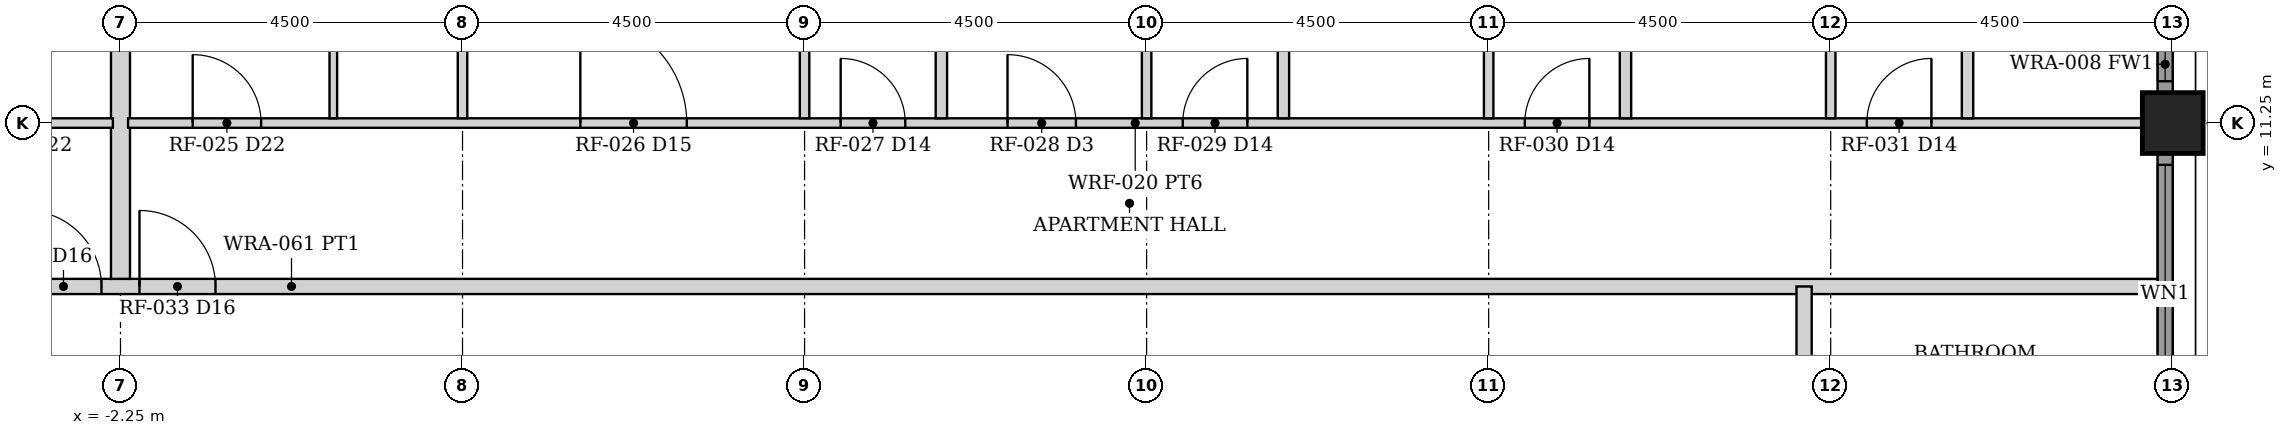
"""IFC4 building model, lengths in metres.
Left out: names, types, materials, properties, quantities, classifications, styles, units other than length and angle.
Written with IfcOpenShell. Run it as: python <this file> out.ifc"""

import sys

from ifc_helpers import new_model, si_unit, direction, frame, frame_2d, origin, origin_2d, place, context, subcontext, project, spatial, rectangle, hollow_rectangle, extrude, element, fill, save


model = new_model("IFC4")
c1 = context("Model", 3, precision=1e-05, world=origin(), true_north=direction((0.0, 1.0)))
c2 = subcontext(c1, "Body", "Model", "MODEL_VIEW")
j1 = project(units=[si_unit("LENGTHUNIT", "METRE"), si_unit("PLANEANGLEUNIT", "RADIAN")], contexts=[c1])
p1 = place(None, origin())
s1 = spatial("IfcSite", under=j1, at=p1, CompositionType="ELEMENT")
p2 = place(p1, origin())
s2 = spatial("IfcBuilding", under=s1, at=p2, CompositionType="ELEMENT")
p3 = place(p2, frame((0.0, 0.0, 79.0)))
s3 = spatial("IfcBuildingStorey", under=s2, at=p3, CompositionType="ELEMENT", Elevation=79.0)
p4 = place(p3, frame((24.75, 11.25, 0.0), z_axis=(0.0, 0.0, 1.0), x_axis=(1.0, 0.0, 0.0)))
e1 = element("IfcColumn", 1, at=p4, inside=s3, PredefinedType="COLUMN", context=c2, shape_type="SweptSolid", body=[
    extrude(hollow_rectangle(XDim=0.8, YDim=0.8, WallThickness=0.06, at=origin_2d()), origin(), (0.0, 0.0, 1.0), 3.5),
])
p5 = place(p3, frame((24.65, 7.155, 0.0), z_axis=(0.0, 0.0, 1.0), x_axis=(0.0, 1.0, 0.0)))
e2 = element("IfcWall", 2, at=p5, inside=s3, PredefinedType="SOLIDWALL", context=c2, shape_type="SweptSolid", body=[
    extrude(rectangle(XDim=3.69, YDim=0.2, at=frame_2d((1.845, 0.0))), origin(), (0.0, 0.0, 1.0), 2.379),
])
p6 = place(p5, frame((0.145, 0.0, 0.3)))
e3 = element("IfcOpeningElement", 3, at=p6, cuts=e2, PredefinedType="OPENING", context=c2, shape_type="SweptSolid", body=[
    extrude(rectangle(XDim=3.4, YDim=1.929, at=frame_2d((1.7, 0.964))), frame((0.0, 0.11, 0.0), z_axis=(0.0, -1.0, 0.0), x_axis=(1.0, 0.0, 0.0)), (0.0, 0.0, 1.0), 0.22),
])
p7 = place(p3, frame((24.65, 11.655, 0.0), z_axis=(0.0, 0.0, 1.0), x_axis=(0.0, 1.0, 0.0)))
e4 = element("IfcWall", 4, at=p7, inside=s3, PredefinedType="SOLIDWALL", context=c2, shape_type="SweptSolid", body=[
    extrude(rectangle(XDim=3.69, YDim=0.2, at=frame_2d((1.845, 0.0))), origin(), (0.0, 0.0, 1.0), 2.379),
])
p8 = place(p7, frame((0.145, 0.0, 0.3)))
e5 = element("IfcOpeningElement", 5, at=p8, cuts=e4, PredefinedType="OPENING", context=c2, shape_type="SweptSolid", body=[
    extrude(rectangle(XDim=3.4, YDim=1.929, at=frame_2d((1.7, 0.964))), frame((0.0, 0.11, 0.0), z_axis=(0.0, -1.0, 0.0), x_axis=(1.0, 0.0, 0.0)), (0.0, 0.0, 1.0), 0.22),
])
p9 = place(p3, frame((-24.55, 9.1, 0.0), z_axis=(0.0, 0.0, 1.0), x_axis=(1.0, 0.0, 0.0)))
e6 = element("IfcWall", 6, at=p9, inside=s3, PredefinedType="PARTITIONING", context=c2, shape_type="SweptSolid", body=[
    extrude(rectangle(XDim=49.1, YDim=0.2, at=frame_2d((24.55, 0.0))), origin(), (0.0, 0.0, 1.0), 2.373),
])
p10 = place(p9, frame((22.55, 0.0, 0.0)))
e7 = element("IfcOpeningElement", 7, at=p10, cuts=e6, PredefinedType="OPENING", context=c2, shape_type="SweptSolid", body=[
    extrude(rectangle(XDim=1.0, YDim=2.3, at=frame_2d((0.5, 1.15))), frame((0.0, 0.11, 0.0), z_axis=(0.0, -1.0, 0.0), x_axis=(1.0, 0.0, 0.0)), (0.0, 0.0, 1.0), 0.22),
])
p11 = place(p9, frame((21.05, 0.0, 0.0)))
e8 = element("IfcOpeningElement", 8, at=p11, cuts=e6, PredefinedType="OPENING", context=c2, shape_type="SweptSolid", body=[
    extrude(rectangle(XDim=1.0, YDim=2.3, at=frame_2d((0.5, 1.15))), frame((0.0, 0.11, 0.0), z_axis=(0.0, -1.0, 0.0), x_axis=(1.0, 0.0, 0.0)), (0.0, 0.0, 1.0), 0.22),
])
p12 = place(p3, frame((19.9, -9.1, 0.0), z_axis=(0.0, 0.0, 1.0), x_axis=(0.0, 1.0, 0.0)))
e9 = element("IfcWall", 9, at=p12, inside=s3, PredefinedType="PARTITIONING", context=c2, shape_type="SweptSolid", body=[
    extrude(rectangle(XDim=18.2, YDim=0.2, at=frame_2d((9.1, 0.0))), origin(), (0.0, 0.0, 1.0), 2.373),
])
p13 = place(p12, frame((6.35, 0.0, 0.0)))
e10 = element("IfcOpeningElement", 10, at=p13, cuts=e9, PredefinedType="OPENING", context=c2, shape_type="SweptSolid", body=[
    extrude(rectangle(XDim=1.0, YDim=2.3, at=frame_2d((0.5, 1.15))), frame((0.0, 0.11, 0.0), z_axis=(0.0, -1.0, 0.0), x_axis=(1.0, 0.0, 0.0)), (0.0, 0.0, 1.0), 0.22),
])
p14 = place(p3, frame((-2.25, 9.2, 0.0), z_axis=(0.0, 0.0, 1.0), x_axis=(0.0, 1.0, 0.0)))
e11 = element("IfcWall", 11, at=p14, inside=s3, PredefinedType="PARTITIONING", context=c2, shape_type="SweptSolid", body=[
    extrude(rectangle(XDim=15.15, YDim=0.25, at=frame_2d((7.575, 0.0))), origin(), (0.0, 0.0, 1.0), 2.373),
])
p15 = place(p3, frame((-2.15, 11.25, 0.0), z_axis=(0.0, 0.0, 1.0), x_axis=(1.0, 0.0, 0.0)))
e12 = element("IfcWall", 12, at=p15, inside=s3, PredefinedType="PARTITIONING", context=c2, shape_type="SweptSolid", body=[
    extrude(rectangle(XDim=26.5, YDim=0.125, at=frame_2d((13.25, 0.0))), origin(), (0.0, 0.0, 1.0), 2.373),
])
p16 = place(p15, frame((0.85, 0.0, 0.0)))
e13 = element("IfcOpeningElement", 13, at=p16, cuts=e12, PredefinedType="OPENING", context=c2, shape_type="SweptSolid", body=[
    extrude(rectangle(XDim=0.9, YDim=2.1, at=frame_2d((0.45, 1.05))), frame((0.0, 0.073, 0.0), z_axis=(0.0, -1.0, 0.0), x_axis=(1.0, 0.0, 0.0)), (0.0, 0.0, 1.0), 0.145),
])
p17 = place(p15, frame((5.95, 0.0, 0.0)))
e14 = element("IfcOpeningElement", 14, at=p17, cuts=e12, PredefinedType="OPENING", context=c2, shape_type="SweptSolid", body=[
    extrude(rectangle(XDim=1.4, YDim=2.1, at=frame_2d((0.7, 1.05))), frame((0.0, 0.073, 0.0), z_axis=(0.0, -1.0, 0.0), x_axis=(1.0, 0.0, 0.0)), (0.0, 0.0, 1.0), 0.145),
])
p18 = place(p15, frame((9.375, 0.0, 0.0)))
e15 = element("IfcOpeningElement", 15, at=p18, cuts=e12, PredefinedType="OPENING", context=c2, shape_type="SweptSolid", body=[
    extrude(rectangle(XDim=0.85, YDim=2.1, at=frame_2d((0.425, 1.05))), frame((0.0, 0.073, 0.0), z_axis=(0.0, -1.0, 0.0), x_axis=(1.0, 0.0, 0.0)), (0.0, 0.0, 1.0), 0.145),
])
p19 = place(p15, frame((11.57, 0.0, 0.0)))
e16 = element("IfcOpeningElement", 16, at=p19, cuts=e12, PredefinedType="OPENING", context=c2, shape_type="SweptSolid", body=[
    extrude(rectangle(XDim=0.9, YDim=2.1, at=frame_2d((0.45, 1.05))), frame((0.0, 0.073, 0.0), z_axis=(0.0, -1.0, 0.0), x_axis=(1.0, 0.0, 0.0)), (0.0, 0.0, 1.0), 0.145),
])
p20 = place(p15, frame((13.875, 0.0, 0.0)))
e17 = element("IfcOpeningElement", 17, at=p20, cuts=e12, PredefinedType="OPENING", context=c2, shape_type="SweptSolid", body=[
    extrude(rectangle(XDim=0.85, YDim=2.1, at=frame_2d((0.425, 1.05))), frame((0.0, 0.073, 0.0), z_axis=(0.0, -1.0, 0.0), x_axis=(1.0, 0.0, 0.0)), (0.0, 0.0, 1.0), 0.145),
])
p21 = place(p15, frame((18.375, 0.0, 0.0)))
e18 = element("IfcOpeningElement", 18, at=p21, cuts=e12, PredefinedType="OPENING", context=c2, shape_type="SweptSolid", body=[
    extrude(rectangle(XDim=0.85, YDim=2.1, at=frame_2d((0.425, 1.05))), frame((0.0, 0.073, 0.0), z_axis=(0.0, -1.0, 0.0), x_axis=(1.0, 0.0, 0.0)), (0.0, 0.0, 1.0), 0.145),
])
p22 = place(p15, frame((22.875, 0.0, 0.0)))
e19 = element("IfcOpeningElement", 19, at=p22, cuts=e12, PredefinedType="OPENING", context=c2, shape_type="SweptSolid", body=[
    extrude(rectangle(XDim=0.85, YDim=2.1, at=frame_2d((0.425, 1.05))), frame((0.0, 0.073, 0.0), z_axis=(0.0, -1.0, 0.0), x_axis=(1.0, 0.0, 0.0)), (0.0, 0.0, 1.0), 0.145),
])
p23 = place(p3, frame((0.55, 11.312, 0.0), z_axis=(0.0, 0.0, 1.0), x_axis=(0.0, 1.0, 0.0)))
e20 = element("IfcWall", 20, at=p23, inside=s3, PredefinedType="PARTITIONING", context=c2, shape_type="SweptSolid", body=[
    extrude(rectangle(XDim=4.05, YDim=0.1, at=frame_2d((2.025, 0.0))), origin(), (0.0, 0.0, 1.0), 2.373),
])
p24 = place(p3, frame((2.25, 11.312, 0.0), z_axis=(0.0, 0.0, 1.0), x_axis=(0.0, 1.0, 0.0)))
e21 = element("IfcWall", 21, at=p24, inside=s3, PredefinedType="PARTITIONING", context=c2, shape_type="SweptSolid", body=[
    extrude(rectangle(XDim=13.038, YDim=0.125, at=frame_2d((6.519, 0.0))), origin(), (0.0, 0.0, 1.0), 2.373),
])
p25 = place(p24, frame((7.794, 0.0, 0.0)))
e22 = element("IfcOpeningElement", 22, at=p25, cuts=e21, PredefinedType="OPENING", context=c2, shape_type="SweptSolid", body=[
    extrude(rectangle(XDim=1.4, YDim=2.1, at=frame_2d((0.7, 1.05))), frame((0.0, 0.073, 0.0), z_axis=(0.0, -1.0, 0.0), x_axis=(1.0, 0.0, 0.0)), (0.0, 0.0, 1.0), 0.145),
])
p26 = place(p3, frame((6.75, 11.312, 0.0), z_axis=(0.0, 0.0, 1.0), x_axis=(0.0, 1.0, 0.0)))
e23 = element("IfcWall", 23, at=p26, inside=s3, PredefinedType="PARTITIONING", context=c2, shape_type="SweptSolid", body=[
    extrude(rectangle(XDim=13.038, YDim=0.125, at=frame_2d((6.519, 0.0))), origin(), (0.0, 0.0, 1.0), 2.373),
])
p27 = place(p3, frame((8.55, 11.312, 0.0), z_axis=(0.0, 0.0, 1.0), x_axis=(0.0, 1.0, 0.0)))
e24 = element("IfcWall", 24, at=p27, inside=s3, PredefinedType="PARTITIONING", context=c2, shape_type="SweptSolid", body=[
    extrude(rectangle(XDim=3.087, YDim=0.15, at=frame_2d((1.544, 0.0))), origin(), (0.0, 0.0, 1.0), 2.373),
])
p28 = place(p27, frame((1.087, 0.0, 0.0)))
e25 = element("IfcOpeningElement", 25, at=p28, cuts=e24, PredefinedType="OPENING", context=c2, shape_type="SweptSolid", body=[
    extrude(rectangle(XDim=0.8, YDim=2.1, at=frame_2d((0.4, 1.05))), frame((0.0, 0.085, 0.0), z_axis=(0.0, -1.0, 0.0), x_axis=(1.0, 0.0, 0.0)), (0.0, 0.0, 1.0), 0.17),
])
p29 = place(p3, frame((11.25, 11.312, 0.0), z_axis=(0.0, 0.0, 1.0), x_axis=(0.0, 1.0, 0.0)))
e26 = element("IfcWall", 26, at=p29, inside=s3, PredefinedType="PARTITIONING", context=c2, shape_type="SweptSolid", body=[
    extrude(rectangle(XDim=13.038, YDim=0.125, at=frame_2d((6.519, 0.0))), origin(), (0.0, 0.0, 1.0), 2.373),
])
p30 = place(p3, frame((13.05, 11.312, 0.0), z_axis=(0.0, 0.0, 1.0), x_axis=(0.0, 1.0, 0.0)))
e27 = element("IfcWall", 27, at=p30, inside=s3, PredefinedType="PARTITIONING", context=c2, shape_type="SweptSolid", body=[
    extrude(rectangle(XDim=3.087, YDim=0.15, at=frame_2d((1.544, 0.0))), origin(), (0.0, 0.0, 1.0), 2.373),
])
p31 = place(p30, frame((1.087, 0.0, 0.0)))
e28 = element("IfcOpeningElement", 28, at=p31, cuts=e27, PredefinedType="OPENING", context=c2, shape_type="SweptSolid", body=[
    extrude(rectangle(XDim=0.8, YDim=2.1, at=frame_2d((0.4, 1.05))), frame((0.0, 0.085, 0.0), z_axis=(0.0, -1.0, 0.0), x_axis=(1.0, 0.0, 0.0)), (0.0, 0.0, 1.0), 0.17),
])
p32 = place(p3, frame((15.75, 11.312, 0.0), z_axis=(0.0, 0.0, 1.0), x_axis=(0.0, 1.0, 0.0)))
e29 = element("IfcWall", 29, at=p32, inside=s3, PredefinedType="PARTITIONING", context=c2, shape_type="SweptSolid", body=[
    extrude(rectangle(XDim=13.038, YDim=0.125, at=frame_2d((6.519, 0.0))), origin(), (0.0, 0.0, 1.0), 2.373),
])
p33 = place(p3, frame((17.55, 11.312, 0.0), z_axis=(0.0, 0.0, 1.0), x_axis=(0.0, 1.0, 0.0)))
e30 = element("IfcWall", 30, at=p33, inside=s3, PredefinedType="PARTITIONING", context=c2, shape_type="SweptSolid", body=[
    extrude(rectangle(XDim=3.087, YDim=0.15, at=frame_2d((1.544, 0.0))), origin(), (0.0, 0.0, 1.0), 2.373),
])
p34 = place(p33, frame((1.087, 0.0, 0.0)))
e31 = element("IfcOpeningElement", 31, at=p34, cuts=e30, PredefinedType="OPENING", context=c2, shape_type="SweptSolid", body=[
    extrude(rectangle(XDim=0.8, YDim=2.1, at=frame_2d((0.4, 1.05))), frame((0.0, 0.085, 0.0), z_axis=(0.0, -1.0, 0.0), x_axis=(1.0, 0.0, 0.0)), (0.0, 0.0, 1.0), 0.17),
])
p35 = place(p3, frame((20.25, 11.312, 0.0), z_axis=(0.0, 0.0, 1.0), x_axis=(0.0, 1.0, 0.0)))
e32 = element("IfcWall", 32, at=p35, inside=s3, PredefinedType="PARTITIONING", context=c2, shape_type="SweptSolid", body=[
    extrude(rectangle(XDim=13.038, YDim=0.125, at=frame_2d((6.519, 0.0))), origin(), (0.0, 0.0, 1.0), 2.373),
])
p36 = place(p3, frame((22.05, 11.312, 0.0), z_axis=(0.0, 0.0, 1.0), x_axis=(0.0, 1.0, 0.0)))
e33 = element("IfcWall", 33, at=p36, inside=s3, PredefinedType="PARTITIONING", context=c2, shape_type="SweptSolid", body=[
    extrude(rectangle(XDim=3.087, YDim=0.15, at=frame_2d((1.544, 0.0))), origin(), (0.0, 0.0, 1.0), 2.373),
])
p37 = place(p36, frame((1.087, 0.0, 0.0)))
e34 = element("IfcOpeningElement", 34, at=p37, cuts=e33, PredefinedType="OPENING", context=c2, shape_type="SweptSolid", body=[
    extrude(rectangle(XDim=0.8, YDim=2.1, at=frame_2d((0.4, 1.05))), frame((0.0, 0.085, 0.0), z_axis=(0.0, -1.0, 0.0), x_axis=(1.0, 0.0, 0.0)), (0.0, 0.0, 1.0), 0.17),
])
p38 = place(p3, frame((-24.35, 11.25, 0.0), z_axis=(0.0, 0.0, 1.0), x_axis=(1.0, 0.0, 0.0)))
e35 = element("IfcWall", 35, at=p38, inside=s3, PredefinedType="PARTITIONING", context=c2, shape_type="SweptSolid", body=[
    extrude(rectangle(XDim=22.0, YDim=0.125, at=frame_2d((11.0, 0.0))), origin(), (0.0, 0.0, 1.0), 2.373),
])
p39 = place(p38, frame((20.25, 0.0, 0.0)))
e36 = element("IfcOpeningElement", 36, at=p39, cuts=e35, PredefinedType="OPENING", context=c2, shape_type="SweptSolid", body=[
    extrude(rectangle(XDim=0.9, YDim=2.1, at=frame_2d((0.45, 1.05))), frame((0.0, 0.073, 0.0), z_axis=(0.0, -1.0, 0.0), x_axis=(1.0, 0.0, 0.0)), (0.0, 0.0, 1.0), 0.145),
])
p40 = place(p38, frame((14.65, 0.0, 0.0)))
e37 = element("IfcOpeningElement", 37, at=p40, cuts=e35, PredefinedType="OPENING", context=c2, shape_type="SweptSolid", body=[
    extrude(rectangle(XDim=1.4, YDim=2.1, at=frame_2d((0.7, 1.05))), frame((0.0, 0.073, 0.0), z_axis=(0.0, -1.0, 0.0), x_axis=(1.0, 0.0, 0.0)), (0.0, 0.0, 1.0), 0.145),
])
p41 = place(p38, frame((11.775, 0.0, 0.0)))
e38 = element("IfcOpeningElement", 38, at=p41, cuts=e35, PredefinedType="OPENING", context=c2, shape_type="SweptSolid", body=[
    extrude(rectangle(XDim=0.85, YDim=2.1, at=frame_2d((0.425, 1.05))), frame((0.0, 0.073, 0.0), z_axis=(0.0, -1.0, 0.0), x_axis=(1.0, 0.0, 0.0)), (0.0, 0.0, 1.0), 0.145),
])
p42 = place(p38, frame((9.53, 0.0, 0.0)))
e39 = element("IfcOpeningElement", 39, at=p42, cuts=e35, PredefinedType="OPENING", context=c2, shape_type="SweptSolid", body=[
    extrude(rectangle(XDim=0.9, YDim=2.1, at=frame_2d((0.45, 1.05))), frame((0.0, 0.073, 0.0), z_axis=(0.0, -1.0, 0.0), x_axis=(1.0, 0.0, 0.0)), (0.0, 0.0, 1.0), 0.145),
])
p43 = place(p38, frame((7.275, 0.0, 0.0)))
e40 = element("IfcOpeningElement", 40, at=p43, cuts=e35, PredefinedType="OPENING", context=c2, shape_type="SweptSolid", body=[
    extrude(rectangle(XDim=0.85, YDim=2.1, at=frame_2d((0.425, 1.05))), frame((0.0, 0.073, 0.0), z_axis=(0.0, -1.0, 0.0), x_axis=(1.0, 0.0, 0.0)), (0.0, 0.0, 1.0), 0.145),
])
p44 = place(p38, frame((2.775, 0.0, 0.0)))
e41 = element("IfcOpeningElement", 41, at=p44, cuts=e35, PredefinedType="OPENING", context=c2, shape_type="SweptSolid", body=[
    extrude(rectangle(XDim=0.85, YDim=2.1, at=frame_2d((0.425, 1.05))), frame((0.0, 0.073, 0.0), z_axis=(0.0, -1.0, 0.0), x_axis=(1.0, 0.0, 0.0)), (0.0, 0.0, 1.0), 0.145),
])
p45 = place(p6, origin())
e42 = element("IfcWindow", 42, at=p45, inside=s3, PartitioningType="SINGLE_PANEL", PredefinedType="WINDOW", context=c2, shape_type="SweptSolid", body=[
    extrude(rectangle(XDim=3.4, YDim=1.929, at=frame_2d((1.7, 0.964))), frame((0.0, 0.03, 0.0), z_axis=(0.0, -1.0, 0.0), x_axis=(1.0, 0.0, 0.0)), (0.0, 0.0, 1.0), 0.06),
])
fill(e3, e42)
p46 = place(p8, origin())
e43 = element("IfcWindow", 43, at=p46, inside=s3, PartitioningType="SINGLE_PANEL", PredefinedType="WINDOW", context=c2, shape_type="SweptSolid", body=[
    extrude(rectangle(XDim=3.4, YDim=1.929, at=frame_2d((1.7, 0.964))), frame((0.0, 0.03, 0.0), z_axis=(0.0, -1.0, 0.0), x_axis=(1.0, 0.0, 0.0)), (0.0, 0.0, 1.0), 0.06),
])
fill(e5, e43)
p47 = place(p10, origin())
e44 = element("IfcDoor", 44, at=p47, inside=s3, OperationType="SINGLE_SWING_LEFT", PredefinedType="DOOR", context=c2, shape_type="SweptSolid", body=[
    extrude(rectangle(XDim=1.0, YDim=2.3, at=frame_2d((0.5, 1.15))), frame((0.0, 0.025, 0.0), z_axis=(0.0, -1.0, 0.0), x_axis=(1.0, 0.0, 0.0)), (0.0, 0.0, 1.0), 0.05),
])
fill(e7, e44)
p48 = place(p16, origin())
e45 = element("IfcDoor", 45, at=p48, inside=s3, OperationType="SINGLE_SWING_LEFT", PredefinedType="DOOR", context=c2, shape_type="SweptSolid", body=[
    extrude(rectangle(XDim=0.9, YDim=2.1, at=frame_2d((0.45, 1.05))), frame((0.0, 0.025, 0.0), z_axis=(0.0, -1.0, 0.0), x_axis=(1.0, 0.0, 0.0)), (0.0, 0.0, 1.0), 0.05),
])
fill(e13, e45)
p49 = place(p17, origin())
e46 = element("IfcDoor", 46, at=p49, inside=s3, OperationType="SINGLE_SWING_LEFT", PredefinedType="DOOR", context=c2, shape_type="SweptSolid", body=[
    extrude(rectangle(XDim=1.4, YDim=2.1, at=frame_2d((0.7, 1.05))), frame((0.0, 0.025, 0.0), z_axis=(0.0, -1.0, 0.0), x_axis=(1.0, 0.0, 0.0)), (0.0, 0.0, 1.0), 0.05),
])
fill(e14, e46)
p50 = place(p18, origin())
e47 = element("IfcDoor", 47, at=p50, inside=s3, OperationType="SINGLE_SWING_LEFT", PredefinedType="DOOR", context=c2, shape_type="SweptSolid", body=[
    extrude(rectangle(XDim=0.85, YDim=2.1, at=frame_2d((0.425, 1.05))), frame((0.0, 0.025, 0.0), z_axis=(0.0, -1.0, 0.0), x_axis=(1.0, 0.0, 0.0)), (0.0, 0.0, 1.0), 0.05),
])
fill(e15, e47)
p51 = place(p19, origin())
e48 = element("IfcDoor", 48, at=p51, inside=s3, OperationType="SINGLE_SWING_LEFT", PredefinedType="DOOR", context=c2, shape_type="SweptSolid", body=[
    extrude(rectangle(XDim=0.9, YDim=2.1, at=frame_2d((0.45, 1.05))), frame((0.0, 0.025, 0.0), z_axis=(0.0, -1.0, 0.0), x_axis=(1.0, 0.0, 0.0)), (0.0, 0.0, 1.0), 0.05),
])
fill(e16, e48)
p52 = place(p20, origin())
e49 = element("IfcDoor", 49, at=p52, inside=s3, OperationType="SINGLE_SWING_RIGHT", PredefinedType="DOOR", context=c2, shape_type="SweptSolid", body=[
    extrude(rectangle(XDim=0.85, YDim=2.1, at=frame_2d((0.425, 1.05))), frame((0.0, 0.025, 0.0), z_axis=(0.0, -1.0, 0.0), x_axis=(1.0, 0.0, 0.0)), (0.0, 0.0, 1.0), 0.05),
])
fill(e17, e49)
p53 = place(p21, origin())
e50 = element("IfcDoor", 50, at=p53, inside=s3, OperationType="SINGLE_SWING_RIGHT", PredefinedType="DOOR", context=c2, shape_type="SweptSolid", body=[
    extrude(rectangle(XDim=0.85, YDim=2.1, at=frame_2d((0.425, 1.05))), frame((0.0, 0.025, 0.0), z_axis=(0.0, -1.0, 0.0), x_axis=(1.0, 0.0, 0.0)), (0.0, 0.0, 1.0), 0.05),
])
fill(e18, e50)
p54 = place(p22, origin())
e51 = element("IfcDoor", 51, at=p54, inside=s3, OperationType="SINGLE_SWING_RIGHT", PredefinedType="DOOR", context=c2, shape_type="SweptSolid", body=[
    extrude(rectangle(XDim=0.85, YDim=2.1, at=frame_2d((0.425, 1.05))), frame((0.0, 0.025, 0.0), z_axis=(0.0, -1.0, 0.0), x_axis=(1.0, 0.0, 0.0)), (0.0, 0.0, 1.0), 0.05),
])
fill(e19, e51)
p55 = place(p11, origin())
e52 = element("IfcDoor", 52, at=p55, inside=s3, OperationType="SINGLE_SWING_LEFT", PredefinedType="DOOR", context=c2, shape_type="SweptSolid", body=[
    extrude(rectangle(XDim=1.0, YDim=2.3, at=frame_2d((0.5, 1.15))), frame((0.0, 0.025, 0.0), z_axis=(0.0, -1.0, 0.0), x_axis=(1.0, 0.0, 0.0)), (0.0, 0.0, 1.0), 0.05),
])
fill(e8, e52)
save(model, sys.argv[1])
